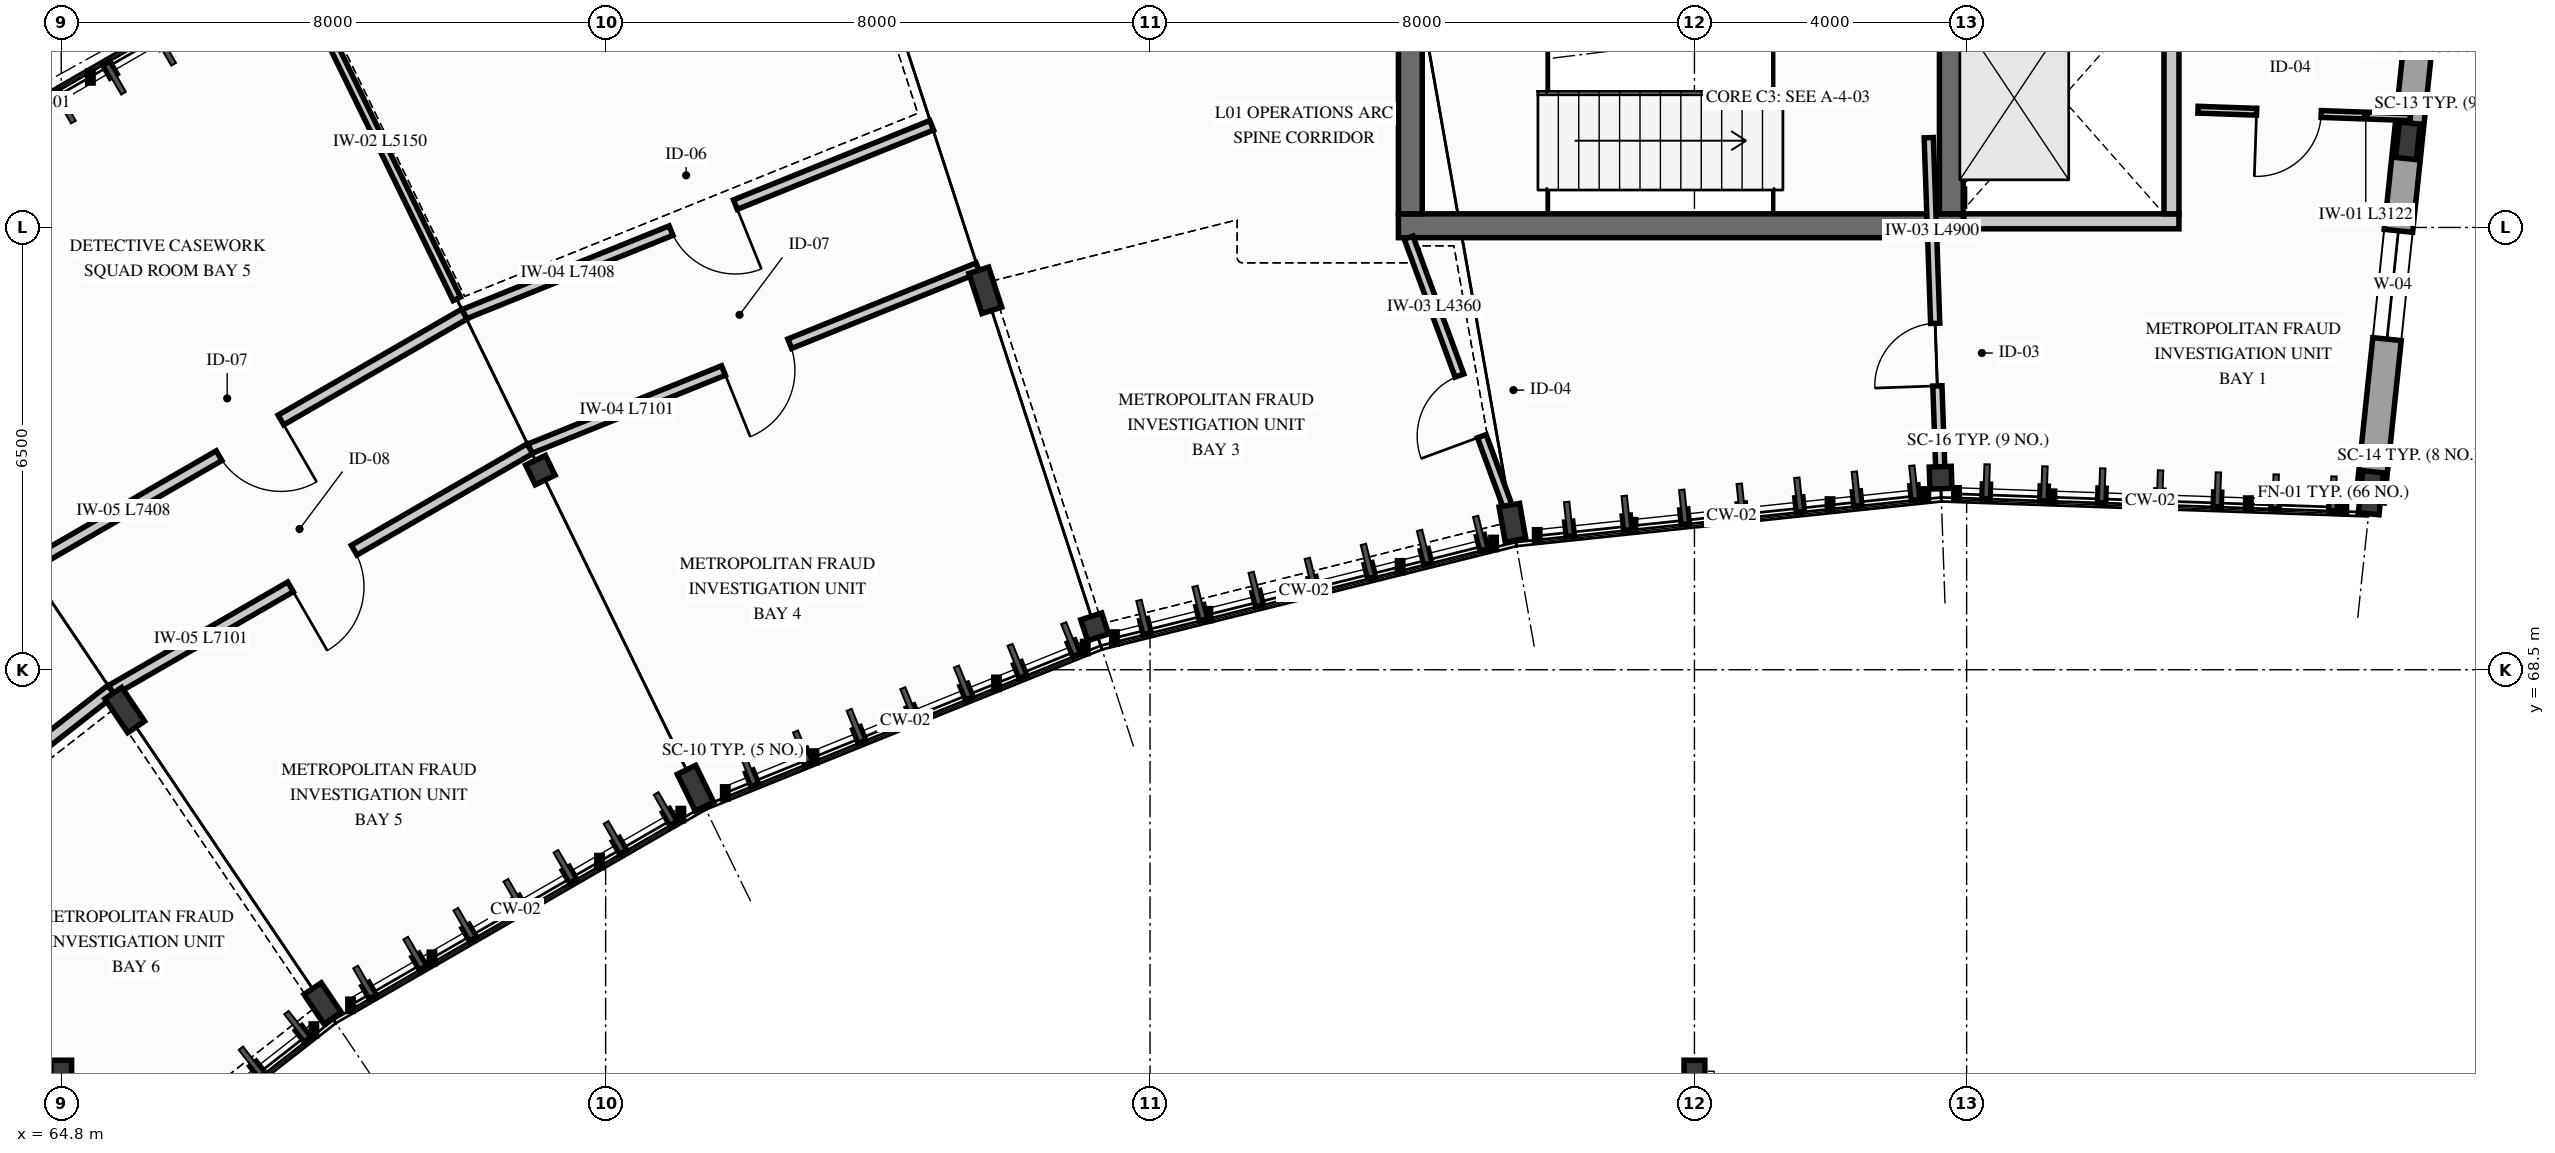
"""IFC4 building model, lengths in metres.
Left out: names, types, materials, properties, quantities, classifications, styles, units other than length and angle.
Written with IfcOpenShell. Run it as: python <this file> out.ifc"""

import sys

from ifc_helpers import new_model, si_unit, direction, frame, frame_2d, origin, origin_2d, place, context, subcontext, project, spatial, rectangle, hollow_circle, i_section, extrude, element, fill, save


model = new_model("IFC4")
c1 = context("Model", 3, precision=1e-05, world=origin(), true_north=direction((0.0, 1.0)))
c2 = subcontext(c1, "Body", "Model", "MODEL_VIEW")
j1 = project(units=[si_unit("LENGTHUNIT", "METRE"), si_unit("PLANEANGLEUNIT", "RADIAN")], contexts=[c1])
p1 = place(None, origin())
s1 = spatial("IfcSite", under=j1, at=p1, CompositionType="ELEMENT")
p2 = place(p1, origin())
s2 = spatial("IfcBuilding", under=s1, at=p2, CompositionType="ELEMENT")
p3 = place(p2, frame((0.0, 0.0, 5.1)))
s3 = spatial("IfcBuildingStorey", under=s2, at=p3, CompositionType="ELEMENT", Elevation=5.1)
p4 = place(p3, frame((84.45, 75.025, 0.0), z_axis=(0.0, 0.0, 1.0), x_axis=(1.0, 0.0, 0.0)))
e1 = element("IfcWall", 1, at=p4, inside=s3, PredefinedType="SHEAR", context=c2, shape_type="SweptSolid", body=[
    extrude(rectangle(XDim=8.3, YDim=0.35, at=frame_2d((4.15, 0.0))), origin(), (0.0, 0.0, 1.0), 3.98),
])
p5 = place(p3, frame((84.625, 75.2, 0.0), z_axis=(0.0, 0.0, 1.0), x_axis=(0.0, 1.0, 0.0)))
e2 = element("IfcWall", 2, at=p5, inside=s3, PredefinedType="SHEAR", context=c2, shape_type="SweptSolid", body=[
    extrude(rectangle(XDim=6.8, YDim=0.35, at=frame_2d((3.4, 0.0))), origin(), (0.0, 0.0, 1.0), 3.98),
])
p6 = place(p5, frame((2.6, 0.0, 0.0)))
e3 = element("IfcOpeningElement", 3, at=p6, cuts=e2, PredefinedType="OPENING", context=c2, shape_type="SweptSolid", body=[
    extrude(rectangle(XDim=1.25, YDim=2.2, at=frame_2d((0.625, 1.1))), frame((0.0, 0.185, 0.0), z_axis=(0.0, -1.0, 0.0), x_axis=(1.0, 0.0, 0.0)), (0.0, 0.0, 1.0), 0.37),
])
p7 = place(p3, frame((92.575, 75.2, 0.0), z_axis=(0.0, 0.0, 1.0), x_axis=(0.0, 1.0, 0.0)))
e4 = element("IfcWall", 4, at=p7, inside=s3, PredefinedType="SHEAR", context=c2, shape_type="SweptSolid", body=[
    extrude(rectangle(XDim=6.8, YDim=0.35, at=frame_2d((3.4, 0.0))), origin(), (0.0, 0.0, 1.0), 3.98),
])
p8 = place(p3, frame((98.74, 71.102, 0.0), z_axis=(0.0, 0.0, 1.0), x_axis=(0.994521895368, -0.104528463268, 0.0)))
e5 = element("IfcColumn", 5, at=p8, inside=s3, PredefinedType="COLUMN", context=c2, shape_type="SweptSolid", body=[
    extrude(i_section(OverallWidth=0.305, OverallDepth=0.62, WebThickness=0.021, FlangeThickness=0.04, FilletRadius=0.027, at=origin_2d()), origin(), (0.0, 0.0, 1.0), 4.2),
])
p9 = place(p3, frame((99.284, 76.273, 0.0), z_axis=(0.0, 0.0, 1.0), x_axis=(0.994521895368, -0.104528463268, 0.0)))
e6 = element("IfcColumn", 6, at=p9, inside=s3, PredefinedType="COLUMN", context=c2, shape_type="SweptSolid", body=[
    extrude(i_section(OverallWidth=0.306, OverallDepth=0.524, WebThickness=0.021, FlangeThickness=0.04, FilletRadius=0.027, at=origin_2d()), origin(), (0.0, 0.0, 1.0), 4.2),
])
p10 = place(p3, frame((92.417, 71.323, 0.0), z_axis=(0.0, 0.0, 1.0), x_axis=(0.999390827019, 0.034899496703, 0.0)))
e7 = element("IfcColumn", 7, at=p10, inside=s3, PredefinedType="COLUMN", context=c2, shape_type="SweptSolid", body=[
    extrude(hollow_circle(Radius=0.162, WallThickness=0.016, at=origin_2d()), origin(), (0.0, 0.0, 1.0), 4.2),
])
p11 = place(p3, frame((86.125, 70.661, 0.0), z_axis=(0.0, 0.0, 1.0), x_axis=(0.984807753012, 0.173648177667, 0.0)))
e8 = element("IfcColumn", 8, at=p11, inside=s3, PredefinedType="COLUMN", context=c2, shape_type="SweptSolid", body=[
    extrude(i_section(OverallWidth=0.306, OverallDepth=0.524, WebThickness=0.021, FlangeThickness=0.04, FilletRadius=0.027, at=origin_2d()), origin(), (0.0, 0.0, 1.0), 4.2),
])
p12 = place(p3, frame((79.986, 69.13, 0.0), z_axis=(0.0, 0.0, 1.0), x_axis=(0.951056516295, 0.309016994375, 0.0)))
e9 = element("IfcColumn", 9, at=p12, inside=s3, PredefinedType="COLUMN", context=c2, shape_type="SweptSolid", body=[
    extrude(hollow_circle(Radius=0.162, WallThickness=0.016, at=origin_2d()), origin(), (0.0, 0.0, 1.0), 4.2),
])
p13 = place(p3, frame((78.379, 74.076, 0.0), z_axis=(0.0, 0.0, 1.0), x_axis=(0.951056516295, 0.309016994375, 0.0)))
e10 = element("IfcColumn", 10, at=p13, inside=s3, PredefinedType="COLUMN", context=c2, shape_type="SweptSolid", body=[
    extrude(i_section(OverallWidth=0.305, OverallDepth=0.62, WebThickness=0.021, FlangeThickness=0.04, FilletRadius=0.027, at=origin_2d()), origin(), (0.0, 0.0, 1.0), 4.2),
])
p14 = place(p3, frame((74.12, 66.76, 0.0), z_axis=(0.0, 0.0, 1.0), x_axis=(0.898794046299, 0.438371146789, 0.0)))
e11 = element("IfcColumn", 11, at=p14, inside=s3, PredefinedType="COLUMN", context=c2, shape_type="SweptSolid", body=[
    extrude(i_section(OverallWidth=0.3, OverallDepth=0.6, WebThickness=0.015, FlangeThickness=0.03, FilletRadius=0.027, at=origin_2d()), origin(), (0.0, 0.0, 1.0), 4.2),
])
p15 = place(p3, frame((71.84, 71.434, 0.0), z_axis=(0.0, 0.0, 1.0), x_axis=(0.898794046299, 0.438371146789, 0.0)))
e12 = element("IfcColumn", 12, at=p15, inside=s3, PredefinedType="COLUMN", context=c2, shape_type="SweptSolid", body=[
    extrude(hollow_circle(Radius=0.162, WallThickness=0.016, at=origin_2d()), origin(), (0.0, 0.0, 1.0), 4.2),
])
p16 = place(p3, frame((68.641, 63.597, 0.0), z_axis=(0.0, 0.0, 1.0), x_axis=(0.829037572555, 0.559192903471, 0.0)))
e13 = element("IfcColumn", 13, at=p16, inside=s3, PredefinedType="COLUMN", context=c2, shape_type="SweptSolid", body=[
    extrude(i_section(OverallWidth=0.306, OverallDepth=0.524, WebThickness=0.021, FlangeThickness=0.04, FilletRadius=0.027, at=origin_2d()), origin(), (0.0, 0.0, 1.0), 4.2),
])
p17 = place(p3, frame((65.733, 67.908, 0.0), z_axis=(0.0, 0.0, 1.0), x_axis=(0.829037572555, 0.559192903471, 0.0)))
e14 = element("IfcColumn", 14, at=p17, inside=s3, PredefinedType="COLUMN", context=c2, shape_type="SweptSolid", body=[
    extrude(i_section(OverallWidth=0.3, OverallDepth=0.6, WebThickness=0.015, FlangeThickness=0.03, FilletRadius=0.027, at=origin_2d()), origin(), (0.0, 0.0, 1.0), 4.2),
])
for number, where, z_axis, x_axis in (
    (15, (88.8, 62.5, 0.0), (0.0, 0.0, 1.0), (1.0, 0.0, 0.0)),
    (16, (64.8, 62.5, 0.0), (0.0, 0.0, 1.0), (1.0, 0.0, 0.0)),
):
    element("IfcColumn", number, at=place(p3, frame(where, z_axis=z_axis, x_axis=x_axis)), inside=s3, PredefinedType="COLUMN", context=c2, shape_type="SweptSolid", body=[
        extrude(i_section(OverallWidth=0.306, OverallDepth=0.524, WebThickness=0.021, FlangeThickness=0.04, FilletRadius=0.027, at=origin_2d()), origin(), (0.0, 0.0, 1.0), 3.92),
    ])
p18 = place(p3, frame((98.727, 70.972, 0.0), z_axis=(0.0, 0.0, 1.0), x_axis=(0.104534827036, 0.994521226489, 0.0)))
e17 = element("IfcWall", 17, at=p18, inside=s3, PredefinedType="SOLIDWALL", context=c2, shape_type="SweptSolid", body=[
    extrude(rectangle(XDim=13.56, YDim=0.42, at=frame_2d((6.78, 0.0))), origin(), (0.0, 0.0, 1.0), 3.53),
])
p19 = place(p18, frame((2.4, 0.0, 0.74)))
e18 = element("IfcOpeningElement", 18, at=p19, cuts=e17, PredefinedType="OPENING", context=c2, shape_type="SweptSolid", body=[
    extrude(rectangle(XDim=1.6, YDim=2.4, at=frame_2d((0.8, 1.2))), frame((0.0, 0.22, 0.0), z_axis=(0.0, -1.0, 0.0), x_axis=(1.0, 0.0, 0.0)), (0.0, 0.0, 1.0), 0.44),
])
p20 = place(p18, frame((9.4, 0.0, 0.74)))
e19 = element("IfcOpeningElement", 19, at=p20, cuts=e17, PredefinedType="OPENING", context=c2, shape_type="SweptSolid", body=[
    extrude(rectangle(XDim=1.6, YDim=2.4, at=frame_2d((0.8, 1.2))), frame((0.0, 0.22, 0.0), z_axis=(0.0, -1.0, 0.0), x_axis=(1.0, 0.0, 0.0)), (0.0, 0.0, 1.0), 0.44),
])
p21 = place(p3, frame((92.76, 75.09, 0.0), z_axis=(0.0, 0.0, 1.0), x_axis=(1.0, 0.0, 0.0)))
e20 = element("IfcWall", 20, at=p21, inside=s3, PredefinedType="PARTITIONING", context=c2, shape_type="SweptSolid", body=[
    extrude(rectangle(XDim=3.16, YDim=0.22, at=frame_2d((1.58, 0.0))), origin(), (0.0, 0.0, 1.0), 3.92),
])
p22 = place(p3, frame((95.81, 75.2, 0.0), z_axis=(0.0, 0.0, 1.0), x_axis=(0.0, 1.0, 0.0)))
e21 = element("IfcWall", 21, at=p22, inside=s3, PredefinedType="PARTITIONING", context=c2, shape_type="SweptSolid", body=[
    extrude(rectangle(XDim=3.4, YDim=0.22, at=frame_2d((1.7, 0.0))), origin(), (0.0, 0.0, 1.0), 3.92),
])
p23 = place(p3, frame((92.414, 71.422, 0.0), z_axis=(0.0, 0.0, 1.0), x_axis=(-0.034877560821, 0.999391592796, 0.0)))
e22 = element("IfcWall", 22, at=p23, inside=s3, PredefinedType="PARTITIONING", context=c2, shape_type="SweptSolid", body=[
    extrude(rectangle(XDim=4.9, YDim=0.135, at=frame_2d((2.45, 0.0))), origin(), (0.0, 0.0, 1.0), 3.92),
])
p24 = place(p23, frame((1.25, 0.0, 0.0)))
e23 = element("IfcOpeningElement", 23, at=p24, cuts=e22, PredefinedType="OPENING", context=c2, shape_type="SweptSolid", body=[
    extrude(rectangle(XDim=0.92, YDim=2.12, at=frame_2d((0.46, 1.06))), frame((0.0, 0.077, 0.0), z_axis=(0.0, -1.0, 0.0), x_axis=(1.0, 0.0, 0.0)), (0.0, 0.0, 1.0), 0.155),
])
p25 = place(p3, frame((86.108, 70.76, 0.0), z_axis=(0.0, 0.0, 1.0), x_axis=(-0.345809164341, 0.938304866159, 0.0)))
e24 = element("IfcWall", 24, at=p25, inside=s3, PredefinedType="PARTITIONING", context=c2, shape_type="SweptSolid", body=[
    extrude(rectangle(XDim=4.36, YDim=0.135, at=frame_2d((2.18, 0.0))), origin(), (0.0, 0.0, 1.0), 3.92),
])
p26 = place(p25, frame((1.25, 0.0, 0.0)))
e25 = element("IfcOpeningElement", 25, at=p26, cuts=e24, PredefinedType="OPENING", context=c2, shape_type="SweptSolid", body=[
    extrude(rectangle(XDim=0.95, YDim=2.15, at=frame_2d((0.475, 1.075))), frame((0.0, 0.077, 0.0), z_axis=(0.0, -1.0, 0.0), x_axis=(1.0, 0.0, 0.0)), (0.0, 0.0, 1.0), 0.155),
])
p27 = place(p3, frame((99.321, 76.621, 0.0), z_axis=(0.0, 0.0, 1.0), x_axis=(-0.999389073029, 0.034949688284, 0.0)))
e26 = element("IfcWall", 26, at=p27, inside=s3, PredefinedType="PARTITIONING", context=c2, shape_type="SweptSolid", body=[
    extrude(rectangle(XDim=3.123, YDim=0.1, at=frame_2d((1.561, 0.0))), origin(), (0.0, 0.0, 1.0), 3.92),
])
p28 = place(p27, frame((1.311, 0.0, 0.0)))
e27 = element("IfcOpeningElement", 27, at=p28, cuts=e26, PredefinedType="OPENING", context=c2, shape_type="SweptSolid", body=[
    extrude(rectangle(XDim=0.95, YDim=2.15, at=frame_2d((0.475, 1.075))), frame((0.0, 0.06, 0.0), z_axis=(0.0, -1.0, 0.0), x_axis=(1.0, 0.0, 0.0)), (0.0, 0.0, 1.0), 0.12),
])
p29 = place(p3, frame((78.271, 74.409, 0.0), z_axis=(0.0, 0.0, 1.0), x_axis=(-0.927181218568, -0.374613117677, 0.0)))
e28 = element("IfcWall", 28, at=p29, inside=s3, PredefinedType="PARTITIONING", context=c2, shape_type="SweptSolid", body=[
    extrude(rectangle(XDim=7.101, YDim=0.15, at=frame_2d((3.551, 0.0))), origin(), (0.0, 0.0, 1.0), 3.92),
])
p30 = place(p29, frame((2.983, 0.0, 0.0)))
e29 = element("IfcOpeningElement", 29, at=p30, cuts=e28, PredefinedType="OPENING", context=c2, shape_type="SweptSolid", body=[
    extrude(rectangle(XDim=1.05, YDim=2.2, at=frame_2d((0.525, 1.1))), frame((0.0, 0.085, 0.0), z_axis=(0.0, -1.0, 0.0), x_axis=(1.0, 0.0, 0.0)), (0.0, 0.0, 1.0), 0.17),
])
p31 = place(p3, frame((77.591, 76.501, 0.0), z_axis=(0.0, 0.0, 1.0), x_axis=(-0.927187035022, -0.374598721418, 0.0)))
e30 = element("IfcWall", 30, at=p31, inside=s3, PredefinedType="PARTITIONING", context=c2, shape_type="SweptSolid", body=[
    extrude(rectangle(XDim=7.408, YDim=0.15, at=frame_2d((3.704, 0.0))), origin(), (0.0, 0.0, 1.0), 3.92),
])
p32 = place(p31, frame((3.111, 0.0, 0.0)))
e31 = element("IfcOpeningElement", 31, at=p32, cuts=e30, PredefinedType="OPENING", context=c2, shape_type="SweptSolid", body=[
    extrude(rectangle(XDim=1.02, YDim=2.18, at=frame_2d((0.51, 1.09))), frame((0.0, 0.085, 0.0), z_axis=(0.0, -1.0, 0.0), x_axis=(1.0, 0.0, 0.0)), (0.0, 0.0, 1.0), 0.17),
])
p33 = place(p3, frame((70.613, 73.951, 0.0), z_axis=(0.0, 0.0, 1.0), x_axis=(-0.438355450259, 0.898801701839, 0.0)))
e32 = element("IfcWall", 32, at=p33, inside=s3, PredefinedType="PARTITIONING", context=c2, shape_type="SweptSolid", body=[
    extrude(rectangle(XDim=5.15, YDim=0.12, at=frame_2d((2.575, 0.0))), origin(), (0.0, 0.0, 1.0), 3.53),
])
p34 = place(p3, frame((71.687, 71.749, 0.0), z_axis=(0.0, 0.0, 1.0), x_axis=(-0.866032151687, -0.499988312107, 0.0)))
e33 = element("IfcWall", 33, at=p34, inside=s3, PredefinedType="PARTITIONING", context=c2, shape_type="SweptSolid", body=[
    extrude(rectangle(XDim=7.101, YDim=0.165, at=frame_2d((3.551, 0.0))), origin(), (0.0, 0.0, 1.0), 3.92),
])
p35 = place(p34, frame((2.982, 0.0, 0.0)))
e34 = element("IfcOpeningElement", 34, at=p35, cuts=e33, PredefinedType="OPENING", context=c2, shape_type="SweptSolid", body=[
    extrude(rectangle(XDim=1.08, YDim=2.22, at=frame_2d((0.54, 1.11))), frame((0.0, 0.093, 0.0), z_axis=(0.0, -1.0, 0.0), x_axis=(1.0, 0.0, 0.0)), (0.0, 0.0, 1.0), 0.185),
])
p36 = place(p3, frame((70.722, 73.726, 0.0), z_axis=(0.0, 0.0, 1.0), x_axis=(-0.866019843608, -0.500009630384, 0.0)))
e35 = element("IfcWall", 35, at=p36, inside=s3, PredefinedType="PARTITIONING", context=c2, shape_type="SweptSolid", body=[
    extrude(rectangle(XDim=7.408, YDim=0.165, at=frame_2d((3.704, 0.0))), origin(), (0.0, 0.0, 1.0), 3.92),
])
p37 = place(p36, frame((3.111, 0.0, 0.0)))
e36 = element("IfcOpeningElement", 36, at=p37, cuts=e35, PredefinedType="OPENING", context=c2, shape_type="SweptSolid", body=[
    extrude(rectangle(XDim=1.05, YDim=2.2, at=frame_2d((0.525, 1.1))), frame((0.0, 0.093, 0.0), z_axis=(0.0, -1.0, 0.0), x_axis=(1.0, 0.0, 0.0)), (0.0, 0.0, 1.0), 0.185),
])
p38 = place(p3, frame((65.537, 68.198, 0.0), z_axis=(0.0, 0.0, 1.0), x_axis=(-0.788011863809, -0.615660054329, 0.0)))
e37 = element("IfcWall", 37, at=p38, inside=s3, PredefinedType="PARTITIONING", context=c2, shape_type="SweptSolid", body=[
    extrude(rectangle(XDim=7.101, YDim=0.18, at=frame_2d((3.551, 0.0))), origin(), (0.0, 0.0, 1.0), 3.92),
])
p39 = place(p38, frame((2.982, 0.0, 0.0)))
e38 = element("IfcOpeningElement", 38, at=p39, cuts=e37, PredefinedType="OPENING", context=c2, shape_type="SweptSolid", body=[
    extrude(rectangle(XDim=1.12, YDim=2.2, at=frame_2d((0.56, 1.1))), frame((0.0, 0.1, 0.0), z_axis=(0.0, -1.0, 0.0), x_axis=(1.0, 0.0, 0.0)), (0.0, 0.0, 1.0), 0.2),
])
p40 = place(p19, origin())
e39 = element("IfcWindow", 39, at=p40, inside=s3, PartitioningType="SINGLE_PANEL", PredefinedType="WINDOW", context=c2, shape_type="SweptSolid", body=[
    extrude(rectangle(XDim=1.6, YDim=2.4, at=frame_2d((0.8, 1.2))), frame((0.0, 0.03, 0.0), z_axis=(0.0, -1.0, 0.0), x_axis=(1.0, 0.0, 0.0)), (0.0, 0.0, 1.0), 0.06),
])
fill(e18, e39)
p41 = place(p24, origin())
e40 = element("IfcDoor", 40, at=p41, inside=s3, OperationType="SINGLE_SWING_LEFT", PredefinedType="DOOR", context=c2, shape_type="SweptSolid", body=[
    extrude(rectangle(XDim=0.92, YDim=2.12, at=frame_2d((0.46, 1.06))), frame((0.0, 0.025, 0.0), z_axis=(0.0, -1.0, 0.0), x_axis=(1.0, 0.0, 0.0)), (0.0, 0.0, 1.0), 0.05),
])
fill(e23, e40)
p42 = place(p26, origin())
e41 = element("IfcDoor", 41, at=p42, inside=s3, OperationType="SINGLE_SWING_LEFT", PredefinedType="DOOR", context=c2, shape_type="SweptSolid", body=[
    extrude(rectangle(XDim=0.95, YDim=2.15, at=frame_2d((0.475, 1.075))), frame((0.0, 0.025, 0.0), z_axis=(0.0, -1.0, 0.0), x_axis=(1.0, 0.0, 0.0)), (0.0, 0.0, 1.0), 0.05),
])
fill(e25, e41)
p43 = place(p28, origin())
e42 = element("IfcDoor", 42, at=p43, inside=s3, OperationType="SINGLE_SWING_RIGHT", PredefinedType="DOOR", context=c2, shape_type="SweptSolid", body=[
    extrude(rectangle(XDim=0.95, YDim=2.15, at=frame_2d((0.475, 1.075))), frame((0.0, 0.025, 0.0), z_axis=(0.0, -1.0, 0.0), x_axis=(1.0, 0.0, 0.0)), (0.0, 0.0, 1.0), 0.05),
])
fill(e27, e42)
p44 = place(p30, origin())
e43 = element("IfcDoor", 43, at=p44, inside=s3, OperationType="SINGLE_SWING_RIGHT", PredefinedType="DOOR", context=c2, shape_type="SweptSolid", body=[
    extrude(rectangle(XDim=1.05, YDim=2.2, at=frame_2d((0.525, 1.1))), frame((0.0, 0.025, 0.0), z_axis=(0.0, -1.0, 0.0), x_axis=(1.0, 0.0, 0.0)), (0.0, 0.0, 1.0), 0.05),
])
fill(e29, e43)
p45 = place(p32, origin())
e44 = element("IfcDoor", 44, at=p45, inside=s3, OperationType="SINGLE_SWING_LEFT", PredefinedType="DOOR", context=c2, shape_type="SweptSolid", body=[
    extrude(rectangle(XDim=1.02, YDim=2.18, at=frame_2d((0.51, 1.09))), frame((0.0, 0.025, 0.0), z_axis=(0.0, -1.0, 0.0), x_axis=(1.0, 0.0, 0.0)), (0.0, 0.0, 1.0), 0.05),
])
fill(e31, e44)
p46 = place(p35, origin())
e45 = element("IfcDoor", 45, at=p46, inside=s3, OperationType="SINGLE_SWING_RIGHT", PredefinedType="DOOR", context=c2, shape_type="SweptSolid", body=[
    extrude(rectangle(XDim=1.08, YDim=2.22, at=frame_2d((0.54, 1.11))), frame((0.0, 0.025, 0.0), z_axis=(0.0, -1.0, 0.0), x_axis=(1.0, 0.0, 0.0)), (0.0, 0.0, 1.0), 0.05),
])
fill(e34, e45)
p47 = place(p37, origin())
e46 = element("IfcDoor", 46, at=p47, inside=s3, OperationType="SINGLE_SWING_LEFT", PredefinedType="DOOR", context=c2, shape_type="SweptSolid", body=[
    extrude(rectangle(XDim=1.05, YDim=2.2, at=frame_2d((0.525, 1.1))), frame((0.0, 0.025, 0.0), z_axis=(0.0, -1.0, 0.0), x_axis=(1.0, 0.0, 0.0)), (0.0, 0.0, 1.0), 0.05),
])
fill(e36, e46)
save(model, sys.argv[1])
